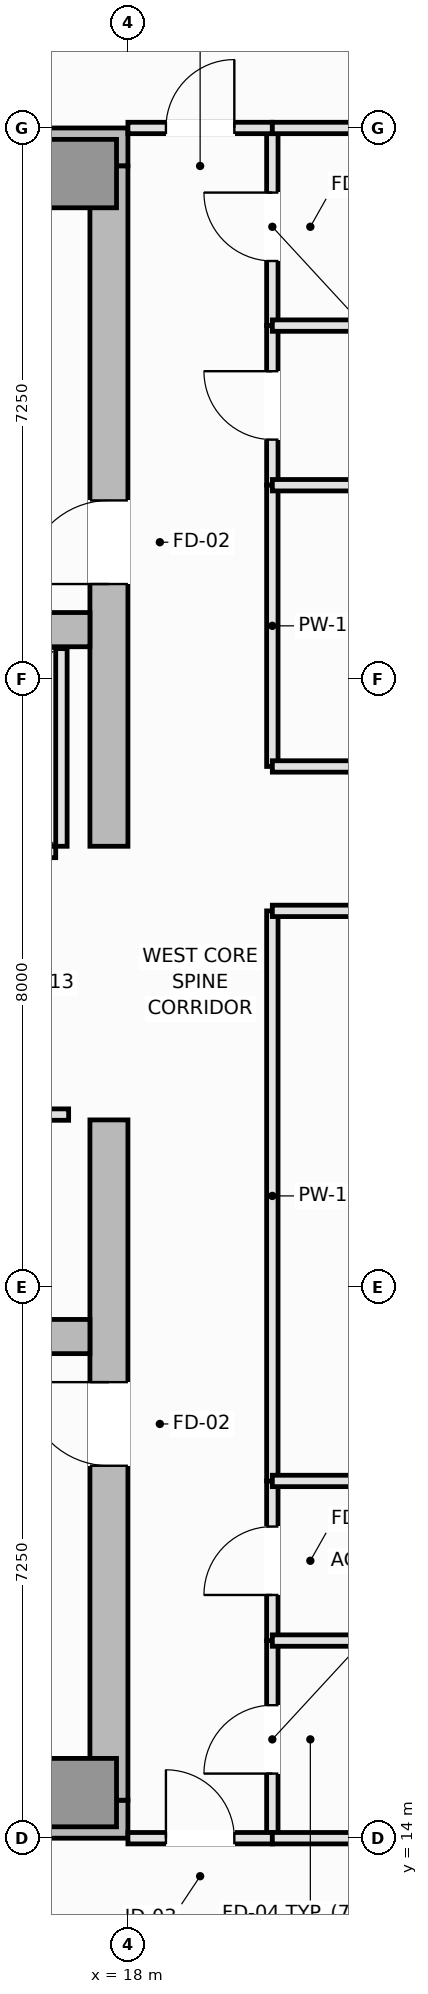
"""IFC4 building model, lengths in metres.
Left out: names, types, materials, properties, quantities, classifications, styles, units other than length and angle.
Written with IfcOpenShell. Run it as: python <this file> out.ifc"""

import sys

from ifc_helpers import new_model, si_unit, direction, frame, frame_2d, origin, origin_2d, place, context, subcontext, project, spatial, rectangle, extrude, element, fill, save


model = new_model("IFC4")
c1 = context("Model", 3, precision=1e-05, world=origin(), true_north=direction((0.0, 1.0)))
c2 = subcontext(c1, "Body", "Model", "MODEL_VIEW")
j1 = project(units=[si_unit("LENGTHUNIT", "METRE"), si_unit("PLANEANGLEUNIT", "RADIAN")], contexts=[c1])
p1 = place(None, origin())
s1 = spatial("IfcSite", under=j1, at=p1, CompositionType="ELEMENT")
p2 = place(p1, origin())
s2 = spatial("IfcBuilding", under=s1, at=p2, CompositionType="ELEMENT")
p3 = place(p2, frame((0.0, 0.0, 259.9)))
s3 = spatial("IfcBuildingStorey", under=s2, at=p3, CompositionType="ELEMENT", Elevation=259.9)
for number, where, z_axis, x_axis in (
    (1, (4.5, 14.25, 0.0), (0.0, 0.0, 1.0), (1.0, 0.0, 0.0)),
    (2, (4.5, 36.25, 0.0), (0.0, 0.0, 1.0), (1.0, 0.0, 0.0)),
):
    element("IfcWall", number, at=place(p3, frame(where, z_axis=z_axis, x_axis=x_axis)), inside=s3, PredefinedType="SHEAR", context=c2, shape_type="SweptSolid", body=[
        extrude(rectangle(XDim=13.5, YDim=0.5, at=frame_2d((6.75, 0.0))), origin(), (0.0, 0.0, 1.0), 3.55),
    ])
p4 = place(p3, frame((17.75, 14.5, 0.0), z_axis=(0.0, 0.0, 1.0), x_axis=(0.0, 1.0, 0.0)))
e3 = element("IfcWall", 3, at=p4, inside=s3, PredefinedType="SHEAR", context=c2, shape_type="SweptSolid", body=[
    extrude(rectangle(XDim=8.95, YDim=0.5, at=frame_2d((4.475, 0.0))), origin(), (0.0, 0.0, 1.0), 3.55),
])
p5 = place(p4, frame((4.4, 0.0, 0.0)))
e4 = element("IfcOpeningElement", 4, at=p5, cuts=e3, PredefinedType="OPENING", context=c2, shape_type="SweptSolid", body=[
    extrude(rectangle(XDim=1.1, YDim=2.15, at=frame_2d((0.55, 1.075))), frame((0.0, 0.26, 0.0), z_axis=(0.0, -1.0, 0.0), x_axis=(1.0, 0.0, 0.0)), (0.0, 0.0, 1.0), 0.52),
])
p6 = place(p3, frame((17.75, 27.05, 0.0), z_axis=(0.0, 0.0, 1.0), x_axis=(0.0, 1.0, 0.0)))
e5 = element("IfcWall", 5, at=p6, inside=s3, PredefinedType="SHEAR", context=c2, shape_type="SweptSolid", body=[
    extrude(rectangle(XDim=8.95, YDim=0.5, at=frame_2d((4.475, 0.0))), origin(), (0.0, 0.0, 1.0), 3.55),
])
p7 = place(p6, frame((3.45, 0.0, 0.0)))
e6 = element("IfcOpeningElement", 6, at=p7, cuts=e5, PredefinedType="OPENING", context=c2, shape_type="SweptSolid", body=[
    extrude(rectangle(XDim=1.1, YDim=2.15, at=frame_2d((0.55, 1.075))), frame((0.0, 0.26, 0.0), z_axis=(0.0, -1.0, 0.0), x_axis=(1.0, 0.0, 0.0)), (0.0, 0.0, 1.0), 0.52),
])
for number, where, z_axis, x_axis in (
    (7, (5.0, 20.6, 0.0), (0.0, 0.0, 1.0), (1.0, 0.0, 0.0)),
    (8, (5.0, 29.9, 0.0), (0.0, 0.0, 1.0), (1.0, 0.0, 0.0)),
):
    element("IfcWall", number, at=place(p3, frame(where, z_axis=z_axis, x_axis=x_axis)), inside=s3, PredefinedType="SHEAR", context=c2, shape_type="SweptSolid", body=[
        extrude(rectangle(XDim=12.5, YDim=0.45, at=frame_2d((6.25, 0.0))), origin(), (0.0, 0.0, 1.0), 3.55),
    ])
for number, where, z_axis, x_axis in (
    (9, (17.4, 14.6, 0.0), (0.0, 0.0, 1.0), (1.0, 0.0, 0.0)),
    (10, (17.4, 35.9, 0.0), (0.0, 0.0, 1.0), (1.0, 0.0, 0.0)),
):
    element("IfcColumn", number, at=place(p3, frame(where, z_axis=z_axis, x_axis=x_axis)), inside=s3, PredefinedType="PILASTER", context=c2, shape_type="SweptSolid", body=[
        extrude(rectangle(XDim=0.9, YDim=0.9, at=origin_2d()), origin(), (0.0, 0.0, 1.0), 3.55),
    ])
p8 = place(p3, frame((14.5, 26.975, 0.0), z_axis=(0.0, 0.0, 1.0), x_axis=(1.0, 0.0, 0.0)))
e11 = element("IfcWall", 11, at=p8, inside=s3, PredefinedType="PARTITIONING", context=c2, shape_type="SweptSolid", body=[
    extrude(rectangle(XDim=2.55, YDim=0.15, at=frame_2d((1.275, 0.0))), origin(), (0.0, 0.0, 1.0), 3.39),
])
p9 = place(p8, frame((0.625, 0.0, 0.0)))
e12 = element("IfcOpeningElement", 12, at=p9, cuts=e11, PredefinedType="OPENING", context=c2, shape_type="SweptSolid", body=[
    extrude(rectangle(XDim=1.3, YDim=2.2, at=frame_2d((0.65, 1.1))), frame((0.0, 0.085, 0.0), z_axis=(0.0, -1.0, 0.0), x_axis=(1.0, 0.0, 0.0)), (0.0, 0.0, 1.0), 0.17),
])
p10 = place(p3, frame((17.125, 27.05, 0.0), z_axis=(0.0, 0.0, 1.0), x_axis=(0.0, 1.0, 0.0)))
e13 = element("IfcWall", 13, at=p10, inside=s3, PredefinedType="PARTITIONING", context=c2, shape_type="SweptSolid", body=[
    extrude(rectangle(XDim=2.6, YDim=0.15, at=frame_2d((1.3, 0.0))), origin(), (0.0, 0.0, 1.0), 3.39),
])
p11 = place(p3, frame((14.33, 23.52, 0.0), z_axis=(0.0, 0.0, 1.0), x_axis=(1.0, 0.0, 0.0)))
e14 = element("IfcWall", 14, at=p11, inside=s3, PredefinedType="PARTITIONING", context=c2, shape_type="SweptSolid", body=[
    extrude(rectangle(XDim=2.89, YDim=0.15, at=frame_2d((1.445, 0.0))), origin(), (0.0, 0.0, 1.0), 3.39),
])
p12 = place(p11, frame((1.053, 0.0, 0.0)))
e15 = element("IfcOpeningElement", 15, at=p12, cuts=e14, PredefinedType="OPENING", context=c2, shape_type="SweptSolid", body=[
    extrude(rectangle(XDim=0.9, YDim=2.1, at=frame_2d((0.45, 1.05))), frame((0.0, 0.085, 0.0), z_axis=(0.0, -1.0, 0.0), x_axis=(1.0, 0.0, 0.0)), (0.0, 0.0, 1.0), 0.17),
])
p13 = place(p3, frame((19.9, 14.0, 0.0), z_axis=(0.0, 0.0, 1.0), x_axis=(0.0, 1.0, 0.0)))
e16 = element("IfcWall", 16, at=p13, inside=s3, PredefinedType="PLUMBINGWALL", context=c2, shape_type="SweptSolid", body=[
    extrude(rectangle(XDim=2.6, YDim=0.15, at=frame_2d((1.3, 0.0))), origin(), (0.0, 0.0, 1.0), 3.39),
])
p14 = place(p13, frame((0.85, 0.0, 0.0)))
e17 = element("IfcOpeningElement", 17, at=p14, cuts=e16, PredefinedType="OPENING", context=c2, shape_type="SweptSolid", body=[
    extrude(rectangle(XDim=0.9, YDim=2.1, at=frame_2d((0.45, 1.05))), frame((0.0, 0.085, 0.0), z_axis=(0.0, -1.0, 0.0), x_axis=(1.0, 0.0, 0.0)), (0.0, 0.0, 1.0), 0.17),
])
p15 = place(p3, frame((19.9, 33.9, 0.0), z_axis=(0.0, 0.0, 1.0), x_axis=(0.0, 1.0, 0.0)))
e18 = element("IfcWall", 18, at=p15, inside=s3, PredefinedType="PLUMBINGWALL", context=c2, shape_type="SweptSolid", body=[
    extrude(rectangle(XDim=2.6, YDim=0.15, at=frame_2d((1.3, 0.0))), origin(), (0.0, 0.0, 1.0), 3.39),
])
p16 = place(p15, frame((0.85, 0.0, 0.0)))
e19 = element("IfcOpeningElement", 19, at=p16, cuts=e18, PredefinedType="OPENING", context=c2, shape_type="SweptSolid", body=[
    extrude(rectangle(XDim=0.9, YDim=2.1, at=frame_2d((0.45, 1.05))), frame((0.0, 0.085, 0.0), z_axis=(0.0, -1.0, 0.0), x_axis=(1.0, 0.0, 0.0)), (0.0, 0.0, 1.0), 0.17),
])
p17 = place(p3, frame((19.9, 16.6, 0.0), z_axis=(0.0, 0.0, 1.0), x_axis=(0.0, 1.0, 0.0)))
e20 = element("IfcWall", 20, at=p17, inside=s3, PredefinedType="PLUMBINGWALL", context=c2, shape_type="SweptSolid", body=[
    extrude(rectangle(XDim=2.1, YDim=0.15, at=frame_2d((1.05, 0.0))), origin(), (0.0, 0.0, 1.0), 3.39),
])
p18 = place(p17, frame((0.6, 0.0, 0.0)))
e21 = element("IfcOpeningElement", 21, at=p18, cuts=e20, PredefinedType="OPENING", context=c2, shape_type="SweptSolid", body=[
    extrude(rectangle(XDim=0.9, YDim=2.1, at=frame_2d((0.45, 1.05))), frame((0.0, 0.085, 0.0), z_axis=(0.0, -1.0, 0.0), x_axis=(1.0, 0.0, 0.0)), (0.0, 0.0, 1.0), 0.17),
])
p19 = place(p3, frame((19.9, 31.8, 0.0), z_axis=(0.0, 0.0, 1.0), x_axis=(0.0, 1.0, 0.0)))
e22 = element("IfcWall", 22, at=p19, inside=s3, PredefinedType="PLUMBINGWALL", context=c2, shape_type="SweptSolid", body=[
    extrude(rectangle(XDim=2.1, YDim=0.15, at=frame_2d((1.05, 0.0))), origin(), (0.0, 0.0, 1.0), 3.39),
])
p20 = place(p19, frame((0.6, 0.0, 0.0)))
e23 = element("IfcOpeningElement", 23, at=p20, cuts=e22, PredefinedType="OPENING", context=c2, shape_type="SweptSolid", body=[
    extrude(rectangle(XDim=0.9, YDim=2.1, at=frame_2d((0.45, 1.05))), frame((0.0, 0.085, 0.0), z_axis=(0.0, -1.0, 0.0), x_axis=(1.0, 0.0, 0.0)), (0.0, 0.0, 1.0), 0.17),
])
p21 = place(p3, frame((19.9, 18.7, 0.0), z_axis=(0.0, 0.0, 1.0), x_axis=(0.0, 1.0, 0.0)))
e24 = element("IfcWall", 24, at=p21, inside=s3, PredefinedType="PARTITIONING", context=c2, shape_type="SweptSolid", body=[
    extrude(rectangle(XDim=7.5, YDim=0.15, at=frame_2d((3.75, 0.0))), origin(), (0.0, 0.0, 1.0), 3.39),
])
p22 = place(p3, frame((19.9, 28.1, 0.0), z_axis=(0.0, 0.0, 1.0), x_axis=(0.0, 1.0, 0.0)))
e25 = element("IfcWall", 25, at=p22, inside=s3, PredefinedType="PARTITIONING", context=c2, shape_type="SweptSolid", body=[
    extrude(rectangle(XDim=3.7, YDim=0.15, at=frame_2d((1.85, 0.0))), origin(), (0.0, 0.0, 1.0), 3.39),
])
p23 = place(p3, frame((18.0, 14.0, 0.0), z_axis=(0.0, 0.0, 1.0), x_axis=(1.0, 0.0, 0.0)))
e26 = element("IfcWall", 26, at=p23, inside=s3, PredefinedType="PARTITIONING", context=c2, shape_type="SweptSolid", body=[
    extrude(rectangle(XDim=1.9, YDim=0.15, at=frame_2d((0.95, 0.0))), origin(), (0.0, 0.0, 1.0), 3.39),
])
p24 = place(p23, frame((0.5, 0.0, 0.0)))
e27 = element("IfcOpeningElement", 27, at=p24, cuts=e26, PredefinedType="OPENING", context=c2, shape_type="SweptSolid", body=[
    extrude(rectangle(XDim=0.9, YDim=2.1, at=frame_2d((0.45, 1.05))), frame((0.0, 0.085, 0.0), z_axis=(0.0, -1.0, 0.0), x_axis=(1.0, 0.0, 0.0)), (0.0, 0.0, 1.0), 0.17),
])
p25 = place(p3, frame((18.0, 36.5, 0.0), z_axis=(0.0, 0.0, 1.0), x_axis=(1.0, 0.0, 0.0)))
e28 = element("IfcWall", 28, at=p25, inside=s3, PredefinedType="PARTITIONING", context=c2, shape_type="SweptSolid", body=[
    extrude(rectangle(XDim=1.9, YDim=0.15, at=frame_2d((0.95, 0.0))), origin(), (0.0, 0.0, 1.0), 3.39),
])
p26 = place(p25, frame((0.5, 0.0, 0.0)))
e29 = element("IfcOpeningElement", 29, at=p26, cuts=e28, PredefinedType="OPENING", context=c2, shape_type="SweptSolid", body=[
    extrude(rectangle(XDim=0.9, YDim=2.1, at=frame_2d((0.45, 1.05))), frame((0.0, 0.085, 0.0), z_axis=(0.0, -1.0, 0.0), x_axis=(1.0, 0.0, 0.0)), (0.0, 0.0, 1.0), 0.17),
])
p27 = place(p3, frame((19.9, 26.2, 0.0), z_axis=(0.0, 0.0, 1.0), x_axis=(1.0, 0.0, 0.0)))
e30 = element("IfcWall", 30, at=p27, inside=s3, PredefinedType="PARTITIONING", context=c2, shape_type="SweptSolid", body=[
    extrude(rectangle(XDim=10.7, YDim=0.15, at=frame_2d((5.35, 0.0))), origin(), (0.0, 0.0, 1.0), 3.39),
])
p28 = place(p27, frame((4.85, 0.0, 0.0)))
e31 = element("IfcOpeningElement", 31, at=p28, cuts=e30, PredefinedType="OPENING", context=c2, shape_type="SweptSolid", body=[
    extrude(rectangle(XDim=1.0, YDim=2.15, at=frame_2d((0.5, 1.075))), frame((0.0, 0.085, 0.0), z_axis=(0.0, -1.0, 0.0), x_axis=(1.0, 0.0, 0.0)), (0.0, 0.0, 1.0), 0.17),
])
p29 = place(p3, frame((19.9, 28.1, 0.0), z_axis=(0.0, 0.0, 1.0), x_axis=(1.0, 0.0, 0.0)))
e32 = element("IfcWall", 32, at=p29, inside=s3, PredefinedType="PARTITIONING", context=c2, shape_type="SweptSolid", body=[
    extrude(rectangle(XDim=10.7, YDim=0.15, at=frame_2d((5.35, 0.0))), origin(), (0.0, 0.0, 1.0), 3.39),
])
p30 = place(p29, frame((4.85, 0.0, 0.0)))
e33 = element("IfcOpeningElement", 33, at=p30, cuts=e32, PredefinedType="OPENING", context=c2, shape_type="SweptSolid", body=[
    extrude(rectangle(XDim=1.0, YDim=2.15, at=frame_2d((0.5, 1.075))), frame((0.0, 0.085, 0.0), z_axis=(0.0, -1.0, 0.0), x_axis=(1.0, 0.0, 0.0)), (0.0, 0.0, 1.0), 0.17),
])
for number, where, z_axis, x_axis in (
    (34, (19.9, 16.6, 0.0), (0.0, 0.0, 1.0), (1.0, 0.0, 0.0)),
    (35, (19.9, 14.0, 0.0), (0.0, 0.0, 1.0), (1.0, 0.0, 0.0)),
    (36, (19.9, 33.9, 0.0), (0.0, 0.0, 1.0), (1.0, 0.0, 0.0)),
    (37, (19.9, 36.5, 0.0), (0.0, 0.0, 1.0), (1.0, 0.0, 0.0)),
    (38, (19.9, 18.7, 0.0), (0.0, 0.0, 1.0), (1.0, 0.0, 0.0)),
    (39, (19.9, 31.8, 0.0), (0.0, 0.0, 1.0), (1.0, 0.0, 0.0)),
):
    element("IfcWall", number, at=place(p3, frame(where, z_axis=z_axis, x_axis=x_axis)), inside=s3, PredefinedType="PLUMBINGWALL", context=c2, shape_type="SweptSolid", body=[
        extrude(rectangle(XDim=3.6, YDim=0.15, at=frame_2d((1.8, 0.0))), origin(), (0.0, 0.0, 1.0), 3.39),
    ])
p31 = place(p5, origin())
e40 = element("IfcDoor", 40, at=p31, inside=s3, OperationType="SINGLE_SWING_RIGHT", PredefinedType="DOOR", context=c2, shape_type="SweptSolid", body=[
    extrude(rectangle(XDim=1.1, YDim=2.15, at=frame_2d((0.55, 1.075))), frame((0.0, 0.025, 0.0), z_axis=(0.0, -1.0, 0.0), x_axis=(1.0, 0.0, 0.0)), (0.0, 0.0, 1.0), 0.05),
])
fill(e4, e40)
p32 = place(p7, origin())
e41 = element("IfcDoor", 41, at=p32, inside=s3, OperationType="SINGLE_SWING_LEFT", PredefinedType="DOOR", context=c2, shape_type="SweptSolid", body=[
    extrude(rectangle(XDim=1.1, YDim=2.15, at=frame_2d((0.55, 1.075))), frame((0.0, 0.025, 0.0), z_axis=(0.0, -1.0, 0.0), x_axis=(1.0, 0.0, 0.0)), (0.0, 0.0, 1.0), 0.05),
])
fill(e6, e41)
p33 = place(p14, origin())
e42 = element("IfcDoor", 42, at=p33, inside=s3, OperationType="SINGLE_SWING_LEFT", PredefinedType="DOOR", context=c2, shape_type="SweptSolid", body=[
    extrude(rectangle(XDim=0.9, YDim=2.1, at=frame_2d((0.45, 1.05))), frame((0.0, 0.025, 0.0), z_axis=(0.0, -1.0, 0.0), x_axis=(1.0, 0.0, 0.0)), (0.0, 0.0, 1.0), 0.05),
])
fill(e17, e42)
p34 = place(p16, origin())
e43 = element("IfcDoor", 43, at=p34, inside=s3, OperationType="SINGLE_SWING_RIGHT", PredefinedType="DOOR", context=c2, shape_type="SweptSolid", body=[
    extrude(rectangle(XDim=0.9, YDim=2.1, at=frame_2d((0.45, 1.05))), frame((0.0, 0.025, 0.0), z_axis=(0.0, -1.0, 0.0), x_axis=(1.0, 0.0, 0.0)), (0.0, 0.0, 1.0), 0.05),
])
fill(e19, e43)
p35 = place(p18, origin())
e44 = element("IfcDoor", 44, at=p35, inside=s3, OperationType="SINGLE_SWING_LEFT", PredefinedType="DOOR", context=c2, shape_type="SweptSolid", body=[
    extrude(rectangle(XDim=0.9, YDim=2.1, at=frame_2d((0.45, 1.05))), frame((0.0, 0.025, 0.0), z_axis=(0.0, -1.0, 0.0), x_axis=(1.0, 0.0, 0.0)), (0.0, 0.0, 1.0), 0.05),
])
fill(e21, e44)
p36 = place(p20, origin())
e45 = element("IfcDoor", 45, at=p36, inside=s3, OperationType="SINGLE_SWING_RIGHT", PredefinedType="DOOR", context=c2, shape_type="SweptSolid", body=[
    extrude(rectangle(XDim=0.9, YDim=2.1, at=frame_2d((0.45, 1.05))), frame((0.0, 0.025, 0.0), z_axis=(0.0, -1.0, 0.0), x_axis=(1.0, 0.0, 0.0)), (0.0, 0.0, 1.0), 0.05),
])
fill(e23, e45)
p37 = place(p24, origin())
e46 = element("IfcDoor", 46, at=p37, inside=s3, OperationType="SINGLE_SWING_LEFT", PredefinedType="DOOR", context=c2, shape_type="SweptSolid", body=[
    extrude(rectangle(XDim=0.9, YDim=2.1, at=frame_2d((0.45, 1.05))), frame((0.0, 0.025, 0.0), z_axis=(0.0, -1.0, 0.0), x_axis=(1.0, 0.0, 0.0)), (0.0, 0.0, 1.0), 0.05),
])
fill(e27, e46)
p38 = place(p26, origin())
e47 = element("IfcDoor", 47, at=p38, inside=s3, OperationType="SINGLE_SWING_RIGHT", PredefinedType="DOOR", context=c2, shape_type="SweptSolid", body=[
    extrude(rectangle(XDim=0.9, YDim=2.1, at=frame_2d((0.45, 1.05))), frame((0.0, 0.025, 0.0), z_axis=(0.0, -1.0, 0.0), x_axis=(1.0, 0.0, 0.0)), (0.0, 0.0, 1.0), 0.05),
])
fill(e29, e47)
save(model, sys.argv[1])
